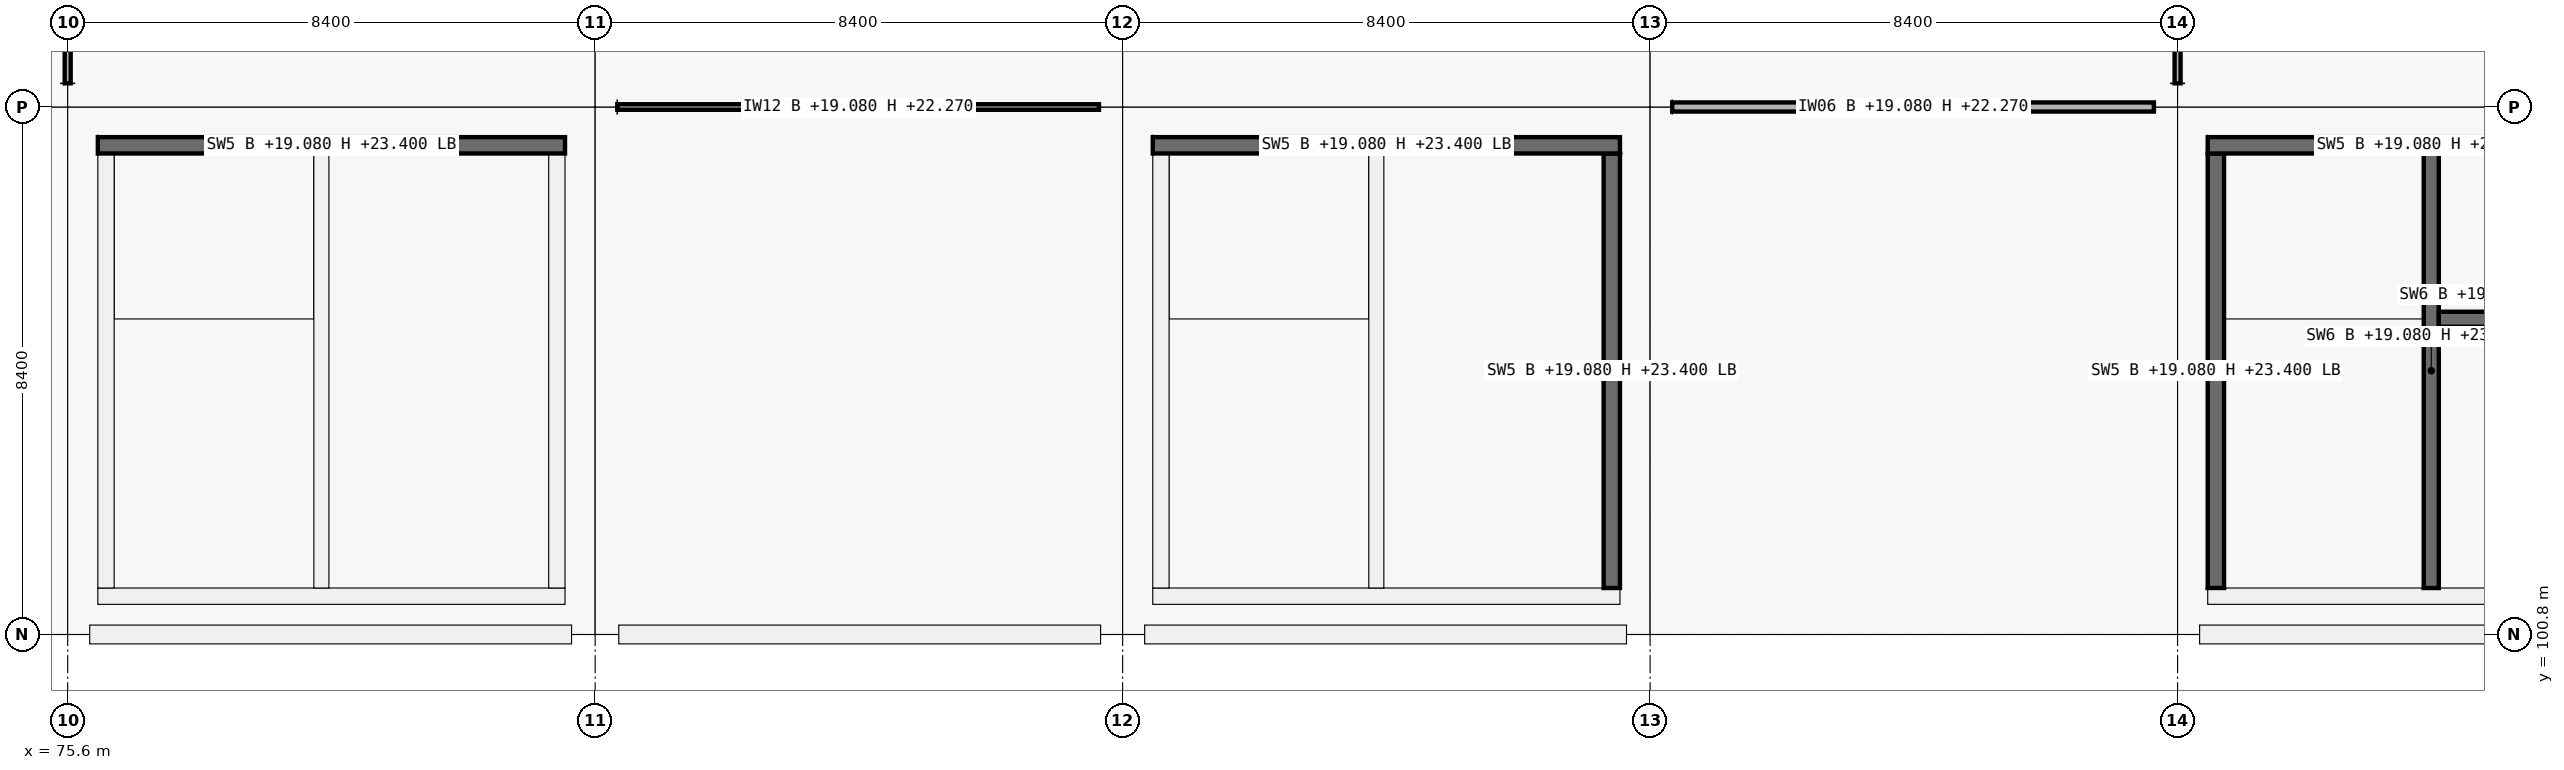
"""IFC4 building model, lengths in metres.
Left out: names, types, materials, properties, quantities, classifications, styles, units other than length and angle.
Written with IfcOpenShell. Run it as: python <this file> out.ifc"""

import sys

from ifc_helpers import new_model, si_unit, direction, frame, frame_2d, origin, origin_2d, place, context, subcontext, project, spatial, rectangle, extrude, element, fill, save


model = new_model("IFC4")
c1 = context("Model", 3, precision=1e-05, world=origin(), true_north=direction((0.0, 1.0)))
c2 = subcontext(c1, "Body", "Model", "MODEL_VIEW")
j1 = project(units=[si_unit("LENGTHUNIT", "METRE"), si_unit("PLANEANGLEUNIT", "RADIAN")], contexts=[c1])
p1 = place(None, origin())
s1 = spatial("IfcSite", under=j1, at=p1, CompositionType="ELEMENT")
p2 = place(p1, origin())
s2 = spatial("IfcBuilding", under=s1, at=p2, CompositionType="ELEMENT")
p3 = place(p2, frame((0.0, 0.0, 19.08)))
s3 = spatial("IfcBuildingStorey", under=s2, at=p3, CompositionType="ELEMENT", Elevation=19.08)
p4 = place(p3, frame((75.6, 100.8, 0.0), z_axis=(0.0, 0.0, 1.0), x_axis=(1.0, 0.0, 0.0)))
e1 = element("IfcColumn", 1, at=p4, inside=s3, PredefinedType="COLUMN", context=c2, shape_type="SweptSolid", body=[
    extrude(rectangle(XDim=0.7, YDim=0.7, at=origin_2d()), origin(), (0.0, 0.0, 1.0), 4.32),
])
for number, where, z_axis, x_axis in (
    (2, (75.6, 109.2, 0.0), (0.0, 0.0, 1.0), (1.0, 0.0, 0.0)),
    (3, (84.0, 100.8, 0.0), (0.0, 0.0, 1.0), (1.0, 0.0, 0.0)),
):
    element("IfcColumn", number, at=place(p3, frame(where, z_axis=z_axis, x_axis=x_axis)), inside=s3, PredefinedType="COLUMN", context=c2, shape_type="SweptSolid", body=[
        extrude(rectangle(XDim=0.75, YDim=0.75, at=origin_2d()), origin(), (0.0, 0.0, 1.0), 4.32),
    ])
for number, where, z_axis, x_axis in (
    (4, (84.0, 109.2, 0.0), (0.0, 0.0, 1.0), (1.0, 0.0, 0.0)),
    (5, (92.4, 100.8, 0.0), (0.0, 0.0, 1.0), (1.0, 0.0, 0.0)),
):
    element("IfcColumn", number, at=place(p3, frame(where, z_axis=z_axis, x_axis=x_axis)), inside=s3, PredefinedType="COLUMN", context=c2, shape_type="SweptSolid", body=[
        extrude(rectangle(XDim=0.7, YDim=0.7, at=origin_2d()), origin(), (0.0, 0.0, 1.0), 4.32),
    ])
for number, where, z_axis, x_axis in (
    (6, (92.4, 109.2, 0.0), (0.0, 0.0, 1.0), (1.0, 0.0, 0.0)),
    (7, (100.8, 100.8, 0.0), (0.0, 0.0, 1.0), (1.0, 0.0, 0.0)),
):
    element("IfcColumn", number, at=place(p3, frame(where, z_axis=z_axis, x_axis=x_axis)), inside=s3, PredefinedType="COLUMN", context=c2, shape_type="SweptSolid", body=[
        extrude(rectangle(XDim=0.75, YDim=0.75, at=origin_2d()), origin(), (0.0, 0.0, 1.0), 4.32),
    ])
for number, where, z_axis, x_axis in (
    (8, (100.8, 109.2, 0.0), (0.0, 0.0, 1.0), (1.0, 0.0, 0.0)),
    (9, (109.2, 100.8, 0.0), (0.0, 0.0, 1.0), (1.0, 0.0, 0.0)),
):
    element("IfcColumn", number, at=place(p3, frame(where, z_axis=z_axis, x_axis=x_axis)), inside=s3, PredefinedType="COLUMN", context=c2, shape_type="SweptSolid", body=[
        extrude(rectangle(XDim=0.7, YDim=0.7, at=origin_2d()), origin(), (0.0, 0.0, 1.0), 4.32),
    ])
p5 = place(p3, frame((109.2, 109.2, 0.0), z_axis=(0.0, 0.0, 1.0), x_axis=(1.0, 0.0, 0.0)))
e10 = element("IfcColumn", 10, at=p5, inside=s3, PredefinedType="COLUMN", context=c2, shape_type="SweptSolid", body=[
    extrude(rectangle(XDim=0.75, YDim=0.75, at=origin_2d()), origin(), (0.0, 0.0, 1.0), 4.32),
])
p6 = place(p3, frame((83.624, 100.8, 0.0), z_axis=(0.0, 0.0, 1.0), x_axis=(-1.0, 0.0, 0.0)))
e11 = element("IfcWall", 11, at=p6, inside=s3, PredefinedType="SOLIDWALL", context=c2, shape_type="SweptSolid", body=[
    extrude(rectangle(XDim=7.673, YDim=0.3, at=frame_2d((3.836, 0.0))), origin(), (0.0, 0.0, 1.0), 3.37),
])
p7 = place(p3, frame((92.049, 100.8, 0.0), z_axis=(0.0, 0.0, 1.0), x_axis=(-1.0, 0.0, 0.0)))
e12 = element("IfcWall", 12, at=p7, inside=s3, PredefinedType="SOLIDWALL", context=c2, shape_type="SweptSolid", body=[
    extrude(rectangle(XDim=7.673, YDim=0.3, at=frame_2d((3.836, 0.0))), origin(), (0.0, 0.0, 1.0), 3.37),
])
p8 = place(p7, frame((2.562, 0.0, 0.9)))
e13 = element("IfcOpeningElement", 13, at=p8, cuts=e12, PredefinedType="OPENING", context=c2, shape_type="SweptSolid", body=[
    extrude(rectangle(XDim=2.55, YDim=1.95, at=frame_2d((1.275, 0.975))), frame((0.0, 0.15, 0.0), z_axis=(0.0, -1.0, 0.0), x_axis=(1.0, 0.0, 0.0)), (0.0, 0.0, 1.0), 0.3),
])
for number, where, z_axis, x_axis in (
    (14, (100.424, 100.8, 0.0), (0.0, 0.0, 1.0), (-1.0, 0.0, 0.0)),
    (15, (117.224, 100.8, 0.0), (0.0, 0.0, 1.0), (-1.0, 0.0, 0.0)),
):
    element("IfcWall", number, at=place(p3, frame(where, z_axis=z_axis, x_axis=x_axis)), inside=s3, PredefinedType="SOLIDWALL", context=c2, shape_type="SweptSolid", body=[
        extrude(rectangle(XDim=7.673, YDim=0.3, at=frame_2d((3.836, 0.0))), origin(), (0.0, 0.0, 1.0), 3.37),
    ])
p9 = place(p3, frame((117.12, 101.41, 0.0), z_axis=(0.0, 0.0, 1.0), x_axis=(-1.0, 0.0, 0.0)))
e16 = element("IfcWall", 16, at=p9, inside=s3, PredefinedType="SHEAR", context=c2, shape_type="SweptSolid", body=[
    extrude(rectangle(XDim=7.44, YDim=0.26, at=frame_2d((3.72, 0.0))), origin(), (0.0, 0.0, 1.0), 4.32),
])
p10 = place(p3, frame((109.81, 101.54, 0.0), z_axis=(0.0, 0.0, 1.0), x_axis=(0.0, 1.0, 0.0)))
e17 = element("IfcWall", 17, at=p10, inside=s3, PredefinedType="SHEAR", context=c2, shape_type="SweptSolid", body=[
    extrude(rectangle(XDim=6.92, YDim=0.26, at=frame_2d((3.46, 0.0))), origin(), (0.0, 0.0, 1.0), 4.32),
])
p11 = place(p3, frame((109.68, 108.59, 0.0), z_axis=(0.0, 0.0, 1.0), x_axis=(1.0, 0.0, 0.0)))
e18 = element("IfcWall", 18, at=p11, inside=s3, PredefinedType="SHEAR", context=c2, shape_type="SweptSolid", body=[
    extrude(rectangle(XDim=7.44, YDim=0.26, at=frame_2d((3.72, 0.0))), origin(), (0.0, 0.0, 1.0), 4.32),
])
p12 = place(p3, frame((113.24, 101.54, 0.0), z_axis=(0.0, 0.0, 1.0), x_axis=(0.0, 1.0, 0.0)))
e19 = element("IfcWall", 19, at=p12, inside=s3, PredefinedType="SHEAR", context=c2, shape_type="SweptSolid", body=[
    extrude(rectangle(XDim=6.92, YDim=0.24, at=frame_2d((3.46, 0.0))), origin(), (0.0, 0.0, 1.0), 4.32),
])
p13 = place(p12, frame((0.12, 0.0, 0.0)))
e20 = element("IfcOpeningElement", 20, at=p13, cuts=e19, PredefinedType="OPENING", context=c2, shape_type="SweptSolid", body=[
    extrude(rectangle(XDim=1.0, YDim=2.15, at=frame_2d((0.5, 1.075))), frame((0.0, 0.12, 0.0), z_axis=(0.0, -1.0, 0.0), x_axis=(1.0, 0.0, 0.0)), (0.0, 0.0, 1.0), 0.24),
])
p14 = place(p3, frame((113.36, 105.82, 0.0), z_axis=(0.0, 0.0, 1.0), x_axis=(1.0, 0.0, 0.0)))
e21 = element("IfcWall", 21, at=p14, inside=s3, PredefinedType="SHEAR", context=c2, shape_type="SweptSolid", body=[
    extrude(rectangle(XDim=3.5, YDim=0.24, at=frame_2d((1.75, 0.0))), origin(), (0.0, 0.0, 1.0), 4.32),
])
p15 = place(p14, frame((1.15, 0.0, 0.0)))
e22 = element("IfcOpeningElement", 22, at=p15, cuts=e21, PredefinedType="OPENING", context=c2, shape_type="SweptSolid", body=[
    extrude(rectangle(XDim=1.2, YDim=2.2, at=frame_2d((0.6, 1.1))), frame((0.0, 0.12, 0.0), z_axis=(0.0, -1.0, 0.0), x_axis=(1.0, 0.0, 0.0)), (0.0, 0.0, 1.0), 0.24),
])
p16 = place(p3, frame((83.52, 101.41, 0.0), z_axis=(0.0, 0.0, 1.0), x_axis=(-1.0, 0.0, 0.0)))
e23 = element("IfcWall", 23, at=p16, inside=s3, PredefinedType="SHEAR", context=c2, shape_type="SweptSolid", body=[
    extrude(rectangle(XDim=7.44, YDim=0.26, at=frame_2d((3.72, 0.0))), origin(), (0.0, 0.0, 1.0), 4.32),
])
p17 = place(p3, frame((76.21, 101.54, 0.0), z_axis=(0.0, 0.0, 1.0), x_axis=(0.0, 1.0, 0.0)))
e24 = element("IfcWall", 24, at=p17, inside=s3, PredefinedType="SHEAR", context=c2, shape_type="SweptSolid", body=[
    extrude(rectangle(XDim=6.92, YDim=0.26, at=frame_2d((3.46, 0.0))), origin(), (0.0, 0.0, 1.0), 4.32),
])
p18 = place(p3, frame((76.08, 108.59, 0.0), z_axis=(0.0, 0.0, 1.0), x_axis=(1.0, 0.0, 0.0)))
e25 = element("IfcWall", 25, at=p18, inside=s3, PredefinedType="SHEAR", context=c2, shape_type="SweptSolid", body=[
    extrude(rectangle(XDim=7.44, YDim=0.26, at=frame_2d((3.72, 0.0))), origin(), (0.0, 0.0, 1.0), 4.32),
])
p19 = place(p3, frame((83.39, 108.46, 0.0), z_axis=(0.0, 0.0, 1.0), x_axis=(0.0, -1.0, 0.0)))
e26 = element("IfcWall", 26, at=p19, inside=s3, PredefinedType="SHEAR", context=c2, shape_type="SweptSolid", body=[
    extrude(rectangle(XDim=6.92, YDim=0.26, at=frame_2d((3.46, 0.0))), origin(), (0.0, 0.0, 1.0), 4.32),
])
p20 = place(p19, frame((4.01, 0.0, 0.0)))
e27 = element("IfcOpeningElement", 27, at=p20, cuts=e26, PredefinedType="OPENING", context=c2, shape_type="SweptSolid", body=[
    extrude(rectangle(XDim=1.5, YDim=2.15, at=frame_2d((0.75, 1.075))), frame((0.0, 0.13, 0.0), z_axis=(0.0, -1.0, 0.0), x_axis=(1.0, 0.0, 0.0)), (0.0, 0.0, 1.0), 0.26),
])
p21 = place(p3, frame((79.64, 101.54, 0.0), z_axis=(0.0, 0.0, 1.0), x_axis=(0.0, 1.0, 0.0)))
e28 = element("IfcWall", 28, at=p21, inside=s3, PredefinedType="SHEAR", context=c2, shape_type="SweptSolid", body=[
    extrude(rectangle(XDim=6.92, YDim=0.24, at=frame_2d((3.46, 0.0))), origin(), (0.0, 0.0, 1.0), 4.32),
])
p22 = place(p21, frame((0.12, 0.0, 0.0)))
e29 = element("IfcOpeningElement", 29, at=p22, cuts=e28, PredefinedType="OPENING", context=c2, shape_type="SweptSolid", body=[
    extrude(rectangle(XDim=1.0, YDim=2.15, at=frame_2d((0.5, 1.075))), frame((0.0, 0.12, 0.0), z_axis=(0.0, -1.0, 0.0), x_axis=(1.0, 0.0, 0.0)), (0.0, 0.0, 1.0), 0.24),
])
p23 = place(p3, frame((100.32, 101.41, 0.0), z_axis=(0.0, 0.0, 1.0), x_axis=(-1.0, 0.0, 0.0)))
e30 = element("IfcWall", 30, at=p23, inside=s3, PredefinedType="SHEAR", context=c2, shape_type="SweptSolid", body=[
    extrude(rectangle(XDim=7.44, YDim=0.26, at=frame_2d((3.72, 0.0))), origin(), (0.0, 0.0, 1.0), 4.32),
])
p24 = place(p3, frame((93.01, 101.54, 0.0), z_axis=(0.0, 0.0, 1.0), x_axis=(0.0, 1.0, 0.0)))
e31 = element("IfcWall", 31, at=p24, inside=s3, PredefinedType="SHEAR", context=c2, shape_type="SweptSolid", body=[
    extrude(rectangle(XDim=6.92, YDim=0.26, at=frame_2d((3.46, 0.0))), origin(), (0.0, 0.0, 1.0), 4.32),
])
p25 = place(p3, frame((92.88, 108.59, 0.0), z_axis=(0.0, 0.0, 1.0), x_axis=(1.0, 0.0, 0.0)))
e32 = element("IfcWall", 32, at=p25, inside=s3, PredefinedType="SHEAR", context=c2, shape_type="SweptSolid", body=[
    extrude(rectangle(XDim=7.44, YDim=0.26, at=frame_2d((3.72, 0.0))), origin(), (0.0, 0.0, 1.0), 4.32),
])
p26 = place(p3, frame((100.19, 108.46, 0.0), z_axis=(0.0, 0.0, 1.0), x_axis=(0.0, -1.0, 0.0)))
e33 = element("IfcWall", 33, at=p26, inside=s3, PredefinedType="SHEAR", context=c2, shape_type="SweptSolid", body=[
    extrude(rectangle(XDim=6.92, YDim=0.26, at=frame_2d((3.46, 0.0))), origin(), (0.0, 0.0, 1.0), 4.32),
])
p27 = place(p26, frame((4.01, 0.0, 0.0)))
e34 = element("IfcOpeningElement", 34, at=p27, cuts=e33, PredefinedType="OPENING", context=c2, shape_type="SweptSolid", body=[
    extrude(rectangle(XDim=1.5, YDim=2.15, at=frame_2d((0.75, 1.075))), frame((0.0, 0.13, 0.0), z_axis=(0.0, -1.0, 0.0), x_axis=(1.0, 0.0, 0.0)), (0.0, 0.0, 1.0), 0.26),
])
p28 = place(p3, frame((96.44, 101.54, 0.0), z_axis=(0.0, 0.0, 1.0), x_axis=(0.0, 1.0, 0.0)))
e35 = element("IfcWall", 35, at=p28, inside=s3, PredefinedType="SHEAR", context=c2, shape_type="SweptSolid", body=[
    extrude(rectangle(XDim=6.92, YDim=0.24, at=frame_2d((3.46, 0.0))), origin(), (0.0, 0.0, 1.0), 4.32),
])
p29 = place(p28, frame((0.12, 0.0, 0.0)))
e36 = element("IfcOpeningElement", 36, at=p29, cuts=e35, PredefinedType="OPENING", context=c2, shape_type="SweptSolid", body=[
    extrude(rectangle(XDim=1.0, YDim=2.15, at=frame_2d((0.5, 1.075))), frame((0.0, 0.12, 0.0), z_axis=(0.0, -1.0, 0.0), x_axis=(1.0, 0.0, 0.0)), (0.0, 0.0, 1.0), 0.24),
])
p30 = place(p3, frame((84.352, 109.2, 0.0), z_axis=(0.0, 0.0, 1.0), x_axis=(1.0, 0.0, 0.0)))
e37 = element("IfcWall", 37, at=p30, inside=s3, PredefinedType="PARTITIONING", context=c2, shape_type="SweptSolid", body=[
    extrude(rectangle(XDim=7.671, YDim=0.088, at=frame_2d((3.835, 0.0))), origin(), (0.0, 0.0, 1.0), 3.19),
])
p31 = place(p30, frame((3.296, 0.0, 0.0)))
e38 = element("IfcOpeningElement", 38, at=p31, cuts=e37, PredefinedType="OPENING", context=c2, shape_type="SweptSolid", body=[
    extrude(rectangle(XDim=1.08, YDim=2.25, at=frame_2d((0.54, 1.125))), frame((0.0, 0.044, 0.0), z_axis=(0.0, -1.0, 0.0), x_axis=(1.0, 0.0, 0.0)), (0.0, 0.0, 1.0), 0.088),
])
p32 = place(p3, frame((101.152, 109.2, 0.0), z_axis=(0.0, 0.0, 1.0), x_axis=(1.0, 0.0, 0.0)))
e39 = element("IfcWall", 39, at=p32, inside=s3, PredefinedType="PARTITIONING", context=c2, shape_type="SweptSolid", body=[
    extrude(rectangle(XDim=7.671, YDim=0.145, at=frame_2d((3.835, 0.0))), origin(), (0.0, 0.0, 1.0), 3.19),
])
p33 = place(p32, frame((3.306, 0.0, 0.0)))
e40 = element("IfcOpeningElement", 40, at=p33, cuts=e39, PredefinedType="OPENING", context=c2, shape_type="SweptSolid", body=[
    extrude(rectangle(XDim=1.06, YDim=2.25, at=frame_2d((0.53, 1.125))), frame((0.0, 0.073, 0.0), z_axis=(0.0, -1.0, 0.0), x_axis=(1.0, 0.0, 0.0)), (0.0, 0.0, 1.0), 0.145),
])
p34 = place(p3, frame((75.6, 109.577, 0.0), z_axis=(0.0, 0.0, 1.0), x_axis=(0.0, 1.0, 0.0)))
e41 = element("IfcWall", 41, at=p34, inside=s3, PredefinedType="PARTITIONING", context=c2, shape_type="SweptSolid", body=[
    extrude(rectangle(XDim=7.721, YDim=0.095, at=frame_2d((3.861, 0.0))), origin(), (0.0, 0.0, 1.0), 3.19),
])
p35 = place(p3, frame((109.2, 109.577, 0.0), z_axis=(0.0, 0.0, 1.0), x_axis=(0.0, 1.0, 0.0)))
e42 = element("IfcWall", 42, at=p35, inside=s3, PredefinedType="PARTITIONING", context=c2, shape_type="SweptSolid", body=[
    extrude(rectangle(XDim=7.721, YDim=0.095, at=frame_2d((3.861, 0.0))), origin(), (0.0, 0.0, 1.0), 3.19),
])
p36 = place(p35, frame((3.351, 0.0, 0.0)))
e43 = element("IfcOpeningElement", 43, at=p36, cuts=e42, PredefinedType="OPENING", context=c2, shape_type="SweptSolid", body=[
    extrude(rectangle(XDim=1.02, YDim=2.2, at=frame_2d((0.51, 1.1))), frame((0.0, 0.047, 0.0), z_axis=(0.0, -1.0, 0.0), x_axis=(1.0, 0.0, 0.0)), (0.0, 0.0, 1.0), 0.095),
])
p37 = place(p8, origin())
e44 = element("IfcWindow", 44, at=p37, inside=s3, PartitioningType="SINGLE_PANEL", PredefinedType="WINDOW", context=c2, shape_type="SweptSolid", body=[
    extrude(rectangle(XDim=2.55, YDim=1.95, at=frame_2d((1.275, 0.975))), frame((0.0, 0.03, 0.0), z_axis=(0.0, -1.0, 0.0), x_axis=(1.0, 0.0, 0.0)), (0.0, 0.0, 1.0), 0.06),
])
fill(e13, e44)
p38 = place(p13, origin())
e45 = element("IfcDoor", 45, at=p38, inside=s3, OperationType="SINGLE_SWING_LEFT", PredefinedType="DOOR", context=c2, shape_type="SweptSolid", body=[
    extrude(rectangle(XDim=1.0, YDim=2.15, at=frame_2d((0.5, 1.075))), frame((0.0, 0.025, 0.0), z_axis=(0.0, -1.0, 0.0), x_axis=(1.0, 0.0, 0.0)), (0.0, 0.0, 1.0), 0.05),
])
fill(e20, e45)
p39 = place(p22, origin())
e46 = element("IfcDoor", 46, at=p39, inside=s3, OperationType="SINGLE_SWING_RIGHT", PredefinedType="DOOR", context=c2, shape_type="SweptSolid", body=[
    extrude(rectangle(XDim=1.0, YDim=2.15, at=frame_2d((0.5, 1.075))), frame((0.0, 0.025, 0.0), z_axis=(0.0, -1.0, 0.0), x_axis=(1.0, 0.0, 0.0)), (0.0, 0.0, 1.0), 0.05),
])
fill(e29, e46)
p40 = place(p20, origin())
e47 = element("IfcDoor", 47, at=p40, inside=s3, OperationType="DOUBLE_DOOR_SINGLE_SWING", PredefinedType="DOOR", context=c2, shape_type="SweptSolid", body=[
    extrude(rectangle(XDim=1.5, YDim=2.15, at=frame_2d((0.75, 1.075))), frame((0.0, 0.025, 0.0), z_axis=(0.0, -1.0, 0.0), x_axis=(1.0, 0.0, 0.0)), (0.0, 0.0, 1.0), 0.05),
])
fill(e27, e47)
p41 = place(p29, origin())
e48 = element("IfcDoor", 48, at=p41, inside=s3, OperationType="SINGLE_SWING_LEFT", PredefinedType="DOOR", context=c2, shape_type="SweptSolid", body=[
    extrude(rectangle(XDim=1.0, YDim=2.15, at=frame_2d((0.5, 1.075))), frame((0.0, 0.025, 0.0), z_axis=(0.0, -1.0, 0.0), x_axis=(1.0, 0.0, 0.0)), (0.0, 0.0, 1.0), 0.05),
])
fill(e36, e48)
p42 = place(p27, origin())
e49 = element("IfcDoor", 49, at=p42, inside=s3, OperationType="DOUBLE_DOOR_SINGLE_SWING", PredefinedType="DOOR", context=c2, shape_type="SweptSolid", body=[
    extrude(rectangle(XDim=1.5, YDim=2.15, at=frame_2d((0.75, 1.075))), frame((0.0, 0.025, 0.0), z_axis=(0.0, -1.0, 0.0), x_axis=(1.0, 0.0, 0.0)), (0.0, 0.0, 1.0), 0.05),
])
fill(e34, e49)
p43 = place(p31, origin())
e50 = element("IfcDoor", 50, at=p43, inside=s3, OperationType="SINGLE_SWING_RIGHT", PredefinedType="DOOR", context=c2, shape_type="SweptSolid", body=[
    extrude(rectangle(XDim=1.08, YDim=2.25, at=frame_2d((0.54, 1.125))), frame((0.0, 0.025, 0.0), z_axis=(0.0, -1.0, 0.0), x_axis=(1.0, 0.0, 0.0)), (0.0, 0.0, 1.0), 0.05),
])
fill(e38, e50)
p44 = place(p33, origin())
e51 = element("IfcDoor", 51, at=p44, inside=s3, OperationType="SINGLE_SWING_LEFT", PredefinedType="DOOR", context=c2, shape_type="SweptSolid", body=[
    extrude(rectangle(XDim=1.06, YDim=2.25, at=frame_2d((0.53, 1.125))), frame((0.0, 0.025, 0.0), z_axis=(0.0, -1.0, 0.0), x_axis=(1.0, 0.0, 0.0)), (0.0, 0.0, 1.0), 0.05),
])
fill(e40, e51)
save(model, sys.argv[1])
